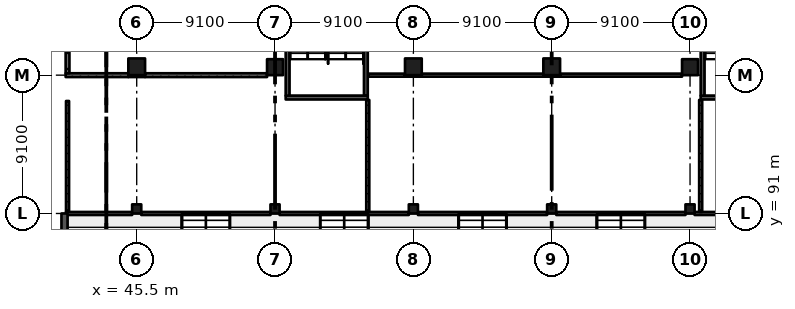
"""IFC4 building model, lengths in metres.
Left out: names, types, materials, properties, quantities, classifications, styles, units other than length and angle.
Written with IfcOpenShell. Run it as: python <this file> out.ifc"""

import sys

from ifc_helpers import new_model, si_unit, direction, frame, frame_2d, origin, origin_2d, place, context, subcontext, project, spatial, rectangle, extrude, element, fill, save


model = new_model("IFC4")
c1 = context("Model", 3, precision=1e-05, world=origin(), true_north=direction((0.0, 1.0)))
c2 = subcontext(c1, "Body", "Model", "MODEL_VIEW")
j1 = project(units=[si_unit("LENGTHUNIT", "METRE"), si_unit("PLANEANGLEUNIT", "RADIAN")], contexts=[c1])
p1 = place(None, origin())
s1 = spatial("IfcSite", under=j1, at=p1, CompositionType="ELEMENT")
p2 = place(p1, origin())
s2 = spatial("IfcBuilding", under=s1, at=p2, CompositionType="ELEMENT")
p3 = place(p2, origin())
s3 = spatial("IfcBuildingStorey", under=s2, at=p3, CompositionType="ELEMENT", Elevation=0.0)
p4 = place(p3, frame((45.5, 91.3, -0.4), z_axis=(0.0, 0.0, 1.0), x_axis=(1.0, 0.0, 0.0)))
e1 = element("IfcColumn", 1, at=p4, inside=s3, PredefinedType="COLUMN", context=c2, shape_type="SweptSolid", body=[
    extrude(rectangle(XDim=0.6, YDim=0.6, at=origin_2d()), origin(), (0.0, 0.0, 1.0), 6.77),
])
p5 = place(p3, frame((45.5, 100.65, -0.4), z_axis=(0.0, 0.0, 1.0), x_axis=(1.0, 0.0, 0.0)))
e2 = element("IfcColumn", 2, at=p5, inside=s3, PredefinedType="COLUMN", context=c2, shape_type="SweptSolid", body=[
    extrude(rectangle(XDim=1.1, YDim=1.1, at=origin_2d()), origin(), (0.0, 0.0, 1.0), 6.77),
])
p6 = place(p3, frame((54.6, 91.3, -0.4), z_axis=(0.0, 0.0, 1.0), x_axis=(1.0, 0.0, 0.0)))
e3 = element("IfcColumn", 3, at=p6, inside=s3, PredefinedType="COLUMN", context=c2, shape_type="SweptSolid", body=[
    extrude(rectangle(XDim=0.6, YDim=0.6, at=origin_2d()), origin(), (0.0, 0.0, 1.0), 6.77),
])
p7 = place(p3, frame((54.6, 100.625, -0.4), z_axis=(0.0, 0.0, 1.0), x_axis=(1.0, 0.0, 0.0)))
e4 = element("IfcColumn", 4, at=p7, inside=s3, PredefinedType="COLUMN", context=c2, shape_type="SweptSolid", body=[
    extrude(rectangle(XDim=1.05, YDim=1.05, at=origin_2d()), origin(), (0.0, 0.0, 1.0), 6.77),
])
p8 = place(p3, frame((63.7, 91.3, -0.4), z_axis=(0.0, 0.0, 1.0), x_axis=(1.0, 0.0, 0.0)))
e5 = element("IfcColumn", 5, at=p8, inside=s3, PredefinedType="COLUMN", context=c2, shape_type="SweptSolid", body=[
    extrude(rectangle(XDim=0.6, YDim=0.6, at=origin_2d()), origin(), (0.0, 0.0, 1.0), 6.77),
])
p9 = place(p3, frame((63.7, 100.65, -0.4), z_axis=(0.0, 0.0, 1.0), x_axis=(1.0, 0.0, 0.0)))
e6 = element("IfcColumn", 6, at=p9, inside=s3, PredefinedType="COLUMN", context=c2, shape_type="SweptSolid", body=[
    extrude(rectangle(XDim=1.1, YDim=1.1, at=origin_2d()), origin(), (0.0, 0.0, 1.0), 6.77),
])
p10 = place(p3, frame((72.8, 91.3, -0.4), z_axis=(0.0, 0.0, 1.0), x_axis=(1.0, 0.0, 0.0)))
e7 = element("IfcColumn", 7, at=p10, inside=s3, PredefinedType="COLUMN", context=c2, shape_type="SweptSolid", body=[
    extrude(rectangle(XDim=0.6, YDim=0.6, at=origin_2d()), origin(), (0.0, 0.0, 1.0), 6.77),
])
p11 = place(p3, frame((72.8, 100.65, -0.4), z_axis=(0.0, 0.0, 1.0), x_axis=(1.0, 0.0, 0.0)))
e8 = element("IfcColumn", 8, at=p11, inside=s3, PredefinedType="COLUMN", context=c2, shape_type="SweptSolid", body=[
    extrude(rectangle(XDim=1.1, YDim=1.1, at=origin_2d()), origin(), (0.0, 0.0, 1.0), 6.77),
])
p12 = place(p3, frame((81.9, 91.3, -0.4), z_axis=(0.0, 0.0, 1.0), x_axis=(1.0, 0.0, 0.0)))
e9 = element("IfcColumn", 9, at=p12, inside=s3, PredefinedType="COLUMN", context=c2, shape_type="SweptSolid", body=[
    extrude(rectangle(XDim=0.6, YDim=0.6, at=origin_2d()), origin(), (0.0, 0.0, 1.0), 6.77),
])
p13 = place(p3, frame((81.9, 100.625, -0.4), z_axis=(0.0, 0.0, 1.0), x_axis=(1.0, 0.0, 0.0)))
e10 = element("IfcColumn", 10, at=p13, inside=s3, PredefinedType="COLUMN", context=c2, shape_type="SweptSolid", body=[
    extrude(rectangle(XDim=1.05, YDim=1.05, at=origin_2d()), origin(), (0.0, 0.0, 1.0), 6.77),
])
p14 = place(p3, frame((40.75, 72.8, -0.4), z_axis=(0.0, 0.0, 1.0), x_axis=(0.0, 1.0, 0.0)))
e11 = element("IfcWall", 11, at=p14, inside=s3, PredefinedType="SHEAR", context=c2, shape_type="SweptSolid", body=[
    extrude(rectangle(XDim=18.2, YDim=0.4, at=frame_2d((9.1, 0.0))), origin(), (0.0, 0.0, 1.0), 6.77),
])
p15 = place(p3, frame((60.7, 98.625, -0.4), z_axis=(0.0, 0.0, 1.0), x_axis=(-1.0, 0.0, 0.0)))
e12 = element("IfcWall", 12, at=p15, inside=s3, PredefinedType="SHEAR", context=c2, shape_type="SweptSolid", body=[
    extrude(rectangle(XDim=5.4, YDim=0.25, at=frame_2d((2.7, 0.0))), origin(), (0.0, 0.0, 1.0), 6.77),
])
p16 = place(p15, frame((1.5, 0.0, 0.4)))
e13 = element("IfcOpeningElement", 13, at=p16, cuts=e12, PredefinedType="OPENING", context=c2, shape_type="SweptSolid", body=[
    extrude(rectangle(XDim=2.4, YDim=2.1, at=frame_2d((1.2, 1.05))), frame((0.0, 0.135, 0.0), z_axis=(0.0, -1.0, 0.0), x_axis=(1.0, 0.0, 0.0)), (0.0, 0.0, 1.0), 0.27),
])
for number, where, z_axis, x_axis in (
    (14, (55.425, 108.35, -0.4), (0.0, 0.0, 1.0), (0.0, -1.0, 0.0)),
    (15, (60.575, 108.35, -0.4), (0.0, 0.0, 1.0), (0.0, -1.0, 0.0)),
):
    element("IfcWall", number, at=place(p3, frame(where, z_axis=z_axis, x_axis=x_axis)), inside=s3, PredefinedType="SHEAR", context=c2, shape_type="SweptSolid", body=[
        extrude(rectangle(XDim=9.6, YDim=0.25, at=frame_2d((4.8, 0.0))), origin(), (0.0, 0.0, 1.0), 6.77),
    ])
p17 = place(p3, frame((88.0, 98.625, -0.4), z_axis=(0.0, 0.0, 1.0), x_axis=(-1.0, 0.0, 0.0)))
e16 = element("IfcWall", 16, at=p17, inside=s3, PredefinedType="SHEAR", context=c2, shape_type="SweptSolid", body=[
    extrude(rectangle(XDim=5.4, YDim=0.25, at=frame_2d((2.7, 0.0))), origin(), (0.0, 0.0, 1.0), 6.77),
])
p18 = place(p17, frame((1.5, 0.0, 0.4)))
e17 = element("IfcOpeningElement", 17, at=p18, cuts=e16, PredefinedType="OPENING", context=c2, shape_type="SweptSolid", body=[
    extrude(rectangle(XDim=2.4, YDim=2.1, at=frame_2d((1.2, 1.05))), frame((0.0, 0.135, 0.0), z_axis=(0.0, -1.0, 0.0), x_axis=(1.0, 0.0, 0.0)), (0.0, 0.0, 1.0), 0.27),
])
p19 = place(p3, frame((82.725, 108.35, -0.4), z_axis=(0.0, 0.0, 1.0), x_axis=(0.0, -1.0, 0.0)))
e18 = element("IfcWall", 18, at=p19, inside=s3, PredefinedType="SHEAR", context=c2, shape_type="SweptSolid", body=[
    extrude(rectangle(XDim=9.6, YDim=0.25, at=frame_2d((4.8, 0.0))), origin(), (0.0, 0.0, 1.0), 6.77),
])
p20 = place(p3, frame((40.825, 100.1, 0.0), z_axis=(0.0, 0.0, 1.0), x_axis=(1.0, 0.0, 0.0)))
e19 = element("IfcWall", 19, at=p20, inside=s3, PredefinedType="SOLIDWALL", context=c2, shape_type="SweptSolid", body=[
    extrude(rectangle(XDim=4.125, YDim=0.25, at=frame_2d((2.062, 0.0))), origin(), (0.0, 0.0, 1.0), 5.32),
])
p21 = place(p3, frame((40.95, 98.4, 0.0), z_axis=(0.0, 0.0, 1.0), x_axis=(0.0, -1.0, 0.0)))
e20 = element("IfcWall", 20, at=p21, inside=s3, PredefinedType="PARTITIONING", context=c2, shape_type="SweptSolid", body=[
    extrude(rectangle(XDim=7.3, YDim=0.2, at=frame_2d((3.65, 0.0))), origin(), (0.0, 0.0, 1.0), 6.02),
])
p22 = place(p21, frame((0.95, 0.0, 0.0)))
e21 = element("IfcOpeningElement", 21, at=p22, cuts=e20, PredefinedType="OPENING", context=c2, shape_type="SweptSolid", body=[
    extrude(rectangle(XDim=1.8, YDim=2.4, at=frame_2d((0.9, 1.2))), frame((0.0, 0.11, 0.0), z_axis=(0.0, -1.0, 0.0), x_axis=(1.0, 0.0, 0.0)), (0.0, 0.0, 1.0), 0.22),
])
p23 = place(p21, frame((4.55, 0.0, 0.0)))
e22 = element("IfcOpeningElement", 22, at=p23, cuts=e20, PredefinedType="OPENING", context=c2, shape_type="SweptSolid", body=[
    extrude(rectangle(XDim=1.8, YDim=2.4, at=frame_2d((0.9, 1.2))), frame((0.0, 0.11, 0.0), z_axis=(0.0, -1.0, 0.0), x_axis=(1.0, 0.0, 0.0)), (0.0, 0.0, 1.0), 0.22),
])
p24 = place(p3, frame((40.95, 109.05, 0.0), z_axis=(0.0, 0.0, 1.0), x_axis=(0.0, -1.0, 0.0)))
e23 = element("IfcWall", 23, at=p24, inside=s3, PredefinedType="SOLIDWALL", context=c2, shape_type="SweptSolid", body=[
    extrude(rectangle(XDim=8.825, YDim=0.25, at=frame_2d((4.413, 0.0))), origin(), (0.0, 0.0, 1.0), 6.02),
])
p25 = place(p3, frame((45.2, 91.0, 0.0), z_axis=(0.0, 0.0, 1.0), x_axis=(-1.0, 0.0, 0.0)))
e24 = element("IfcWall", 24, at=p25, inside=s3, PredefinedType="PARTITIONING", context=c2, shape_type="SweptSolid", body=[
    extrude(rectangle(XDim=4.35, YDim=0.2, at=frame_2d((2.175, 0.0))), origin(), (0.0, 0.0, 1.0), 5.02),
])
for number, where, z_axis, x_axis in (
    (25, (54.3, 91.0, 0.0), (0.0, 0.0, 1.0), (-1.0, 0.0, 0.0)),
    (26, (54.9, 91.0, 0.0), (0.0, 0.0, 1.0), (1.0, 0.0, 0.0)),
):
    element("IfcWall", number, at=place(p3, frame(where, z_axis=z_axis, x_axis=x_axis)), inside=s3, PredefinedType="PARTITIONING", context=c2, shape_type="SweptSolid", body=[
        extrude(rectangle(XDim=8.5, YDim=0.2, at=frame_2d((4.25, 0.0))), origin(), (0.0, 0.0, 1.0), 5.02),
    ])
p26 = place(p3, frame((60.7, 98.47, 0.0), z_axis=(0.0, 0.0, 1.0), x_axis=(0.0, -1.0, 0.0)))
e27 = element("IfcWall", 27, at=p26, inside=s3, PredefinedType="PARTITIONING", context=c2, shape_type="SweptSolid", body=[
    extrude(rectangle(XDim=7.37, YDim=0.2, at=frame_2d((3.685, 0.0))), origin(), (0.0, 0.0, 1.0), 6.02),
])
p27 = place(p26, frame((2.15, 0.0, 0.0)))
e28 = element("IfcOpeningElement", 28, at=p27, cuts=e27, PredefinedType="OPENING", context=c2, shape_type="SweptSolid", body=[
    extrude(rectangle(XDim=3.0, YDim=2.4, at=frame_2d((1.5, 1.2))), frame((0.0, 0.11, 0.0), z_axis=(0.0, -1.0, 0.0), x_axis=(1.0, 0.0, 0.0)), (0.0, 0.0, 1.0), 0.22),
])
p28 = place(p3, frame((60.73, 100.1, 0.0), z_axis=(0.0, 0.0, 1.0), x_axis=(1.0, 0.0, 0.0)))
e29 = element("IfcWall", 29, at=p28, inside=s3, PredefinedType="PARTITIONING", context=c2, shape_type="SweptSolid", body=[
    extrude(rectangle(XDim=2.42, YDim=0.2, at=frame_2d((1.21, 0.0))), origin(), (0.0, 0.0, 1.0), 5.57),
])
p29 = place(p28, frame((0.55, 0.0, 0.0)))
e30 = element("IfcOpeningElement", 30, at=p29, cuts=e29, PredefinedType="OPENING", context=c2, shape_type="SweptSolid", body=[
    extrude(rectangle(XDim=1.8, YDim=2.4, at=frame_2d((0.9, 1.2))), frame((0.0, 0.11, 0.0), z_axis=(0.0, -1.0, 0.0), x_axis=(1.0, 0.0, 0.0)), (0.0, 0.0, 1.0), 0.22),
])
for number, where, z_axis, x_axis in (
    (31, (72.5, 91.0, 0.0), (0.0, 0.0, 1.0), (-1.0, 0.0, 0.0)),
    (32, (81.6, 91.0, 0.0), (0.0, 0.0, 1.0), (-1.0, 0.0, 0.0)),
    (33, (82.2, 91.0, 0.0), (0.0, 0.0, 1.0), (1.0, 0.0, 0.0)),
):
    element("IfcWall", number, at=place(p3, frame(where, z_axis=z_axis, x_axis=x_axis)), inside=s3, PredefinedType="PARTITIONING", context=c2, shape_type="SweptSolid", body=[
        extrude(rectangle(XDim=8.5, YDim=0.2, at=frame_2d((4.25, 0.0))), origin(), (0.0, 0.0, 1.0), 5.02),
    ])
p30 = place(p3, frame((82.6, 98.47, 0.0), z_axis=(0.0, 0.0, 1.0), x_axis=(0.0, -1.0, 0.0)))
e34 = element("IfcWall", 34, at=p30, inside=s3, PredefinedType="PARTITIONING", context=c2, shape_type="SweptSolid", body=[
    extrude(rectangle(XDim=7.37, YDim=0.2, at=frame_2d((3.685, 0.0))), origin(), (0.0, 0.0, 1.0), 6.02),
])
p31 = place(p30, frame((2.15, 0.0, 0.0)))
e35 = element("IfcOpeningElement", 35, at=p31, cuts=e34, PredefinedType="OPENING", context=c2, shape_type="SweptSolid", body=[
    extrude(rectangle(XDim=3.0, YDim=2.4, at=frame_2d((1.5, 1.2))), frame((0.0, 0.11, 0.0), z_axis=(0.0, -1.0, 0.0), x_axis=(1.0, 0.0, 0.0)), (0.0, 0.0, 1.0), 0.22),
])
p32 = place(p3, frame((44.95, 100.1, 0.0), z_axis=(0.0, 0.0, 1.0), x_axis=(1.0, 0.0, 0.0)))
e36 = element("IfcWall", 36, at=p32, inside=s3, PredefinedType="SOLIDWALL", context=c2, shape_type="SweptSolid", body=[
    extrude(rectangle(XDim=1.1, YDim=0.25, at=frame_2d((0.55, 0.0))), origin(), (0.0, 0.0, 1.0), 6.02),
])
p33 = place(p3, frame((46.05, 100.1, 0.0), z_axis=(0.0, 0.0, 1.0), x_axis=(1.0, 0.0, 0.0)))
e37 = element("IfcWall", 37, at=p33, inside=s3, PredefinedType="SOLIDWALL", context=c2, shape_type="SweptSolid", body=[
    extrude(rectangle(XDim=8.025, YDim=0.25, at=frame_2d((4.012, 0.0))), origin(), (0.0, 0.0, 1.0), 5.32),
])
p34 = place(p33, frame((0.525, 0.0, 0.0)))
e38 = element("IfcOpeningElement", 38, at=p34, cuts=e37, PredefinedType="OPENING", context=c2, shape_type="SweptSolid", body=[
    extrude(rectangle(XDim=1.8, YDim=2.1, at=frame_2d((0.9, 1.05))), frame((0.0, 0.135, 0.0), z_axis=(0.0, -1.0, 0.0), x_axis=(1.0, 0.0, 0.0)), (0.0, 0.0, 1.0), 0.27),
])
p35 = place(p3, frame((63.15, 100.1, 0.0), z_axis=(0.0, 0.0, 1.0), x_axis=(1.0, 0.0, 0.0)))
e39 = element("IfcWall", 39, at=p35, inside=s3, PredefinedType="PARTITIONING", context=c2, shape_type="SweptSolid", body=[
    extrude(rectangle(XDim=1.1, YDim=0.2, at=frame_2d((0.55, 0.0))), origin(), (0.0, 0.0, 1.0), 6.02),
])
p36 = place(p3, frame((64.25, 100.1, 0.0), z_axis=(0.0, 0.0, 1.0), x_axis=(1.0, 0.0, 0.0)))
e40 = element("IfcWall", 40, at=p36, inside=s3, PredefinedType="PARTITIONING", context=c2, shape_type="SweptSolid", body=[
    extrude(rectangle(XDim=8.0, YDim=0.2, at=frame_2d((4.0, 0.0))), origin(), (0.0, 0.0, 1.0), 5.32),
])
p37 = place(p36, frame((0.73, 0.0, 0.0)))
e41 = element("IfcOpeningElement", 41, at=p37, cuts=e40, PredefinedType="OPENING", context=c2, shape_type="SweptSolid", body=[
    extrude(rectangle(XDim=1.8, YDim=2.4, at=frame_2d((0.9, 1.2))), frame((0.0, 0.11, 0.0), z_axis=(0.0, -1.0, 0.0), x_axis=(1.0, 0.0, 0.0)), (0.0, 0.0, 1.0), 0.22),
])
p38 = place(p36, frame((4.23, 0.0, 0.0)))
e42 = element("IfcOpeningElement", 42, at=p38, cuts=e40, PredefinedType="OPENING", context=c2, shape_type="SweptSolid", body=[
    extrude(rectangle(XDim=1.8, YDim=2.4, at=frame_2d((0.9, 1.2))), frame((0.0, 0.11, 0.0), z_axis=(0.0, -1.0, 0.0), x_axis=(1.0, 0.0, 0.0)), (0.0, 0.0, 1.0), 0.22),
])
p39 = place(p36, frame((6.13, 0.0, 0.0)))
e43 = element("IfcOpeningElement", 43, at=p39, cuts=e40, PredefinedType="OPENING", context=c2, shape_type="SweptSolid", body=[
    extrude(rectangle(XDim=1.8, YDim=2.4, at=frame_2d((0.9, 1.2))), frame((0.0, 0.11, 0.0), z_axis=(0.0, -1.0, 0.0), x_axis=(1.0, 0.0, 0.0)), (0.0, 0.0, 1.0), 0.22),
])
p40 = place(p3, frame((72.25, 100.1, 0.0), z_axis=(0.0, 0.0, 1.0), x_axis=(1.0, 0.0, 0.0)))
e44 = element("IfcWall", 44, at=p40, inside=s3, PredefinedType="PARTITIONING", context=c2, shape_type="SweptSolid", body=[
    extrude(rectangle(XDim=1.1, YDim=0.2, at=frame_2d((0.55, 0.0))), origin(), (0.0, 0.0, 1.0), 6.02),
])
p41 = place(p3, frame((73.35, 100.1, 0.0), z_axis=(0.0, 0.0, 1.0), x_axis=(1.0, 0.0, 0.0)))
e45 = element("IfcWall", 45, at=p41, inside=s3, PredefinedType="PARTITIONING", context=c2, shape_type="SweptSolid", body=[
    extrude(rectangle(XDim=8.025, YDim=0.2, at=frame_2d((4.012, 0.0))), origin(), (0.0, 0.0, 1.0), 5.32),
])
p42 = place(p41, frame((1.93, 0.0, 0.0)))
e46 = element("IfcOpeningElement", 46, at=p42, cuts=e45, PredefinedType="OPENING", context=c2, shape_type="SweptSolid", body=[
    extrude(rectangle(XDim=1.8, YDim=2.4, at=frame_2d((0.9, 1.2))), frame((0.0, 0.11, 0.0), z_axis=(0.0, -1.0, 0.0), x_axis=(1.0, 0.0, 0.0)), (0.0, 0.0, 1.0), 0.22),
])
p43 = place(p41, frame((5.43, 0.0, 0.0)))
e47 = element("IfcOpeningElement", 47, at=p43, cuts=e45, PredefinedType="OPENING", context=c2, shape_type="SweptSolid", body=[
    extrude(rectangle(XDim=1.8, YDim=2.4, at=frame_2d((0.9, 1.2))), frame((0.0, 0.11, 0.0), z_axis=(0.0, -1.0, 0.0), x_axis=(1.0, 0.0, 0.0)), (0.0, 0.0, 1.0), 0.22),
])
p44 = place(p34, origin())
e48 = element("IfcDoor", 48, at=p44, inside=s3, OperationType="DOUBLE_DOOR_SINGLE_SWING", PredefinedType="DOOR", context=c2, shape_type="SweptSolid", body=[
    extrude(rectangle(XDim=1.8, YDim=2.1, at=frame_2d((0.9, 1.05))), frame((0.0, 0.025, 0.0), z_axis=(0.0, -1.0, 0.0), x_axis=(1.0, 0.0, 0.0)), (0.0, 0.0, 1.0), 0.05),
])
fill(e38, e48)
p45 = place(p22, origin())
e49 = element("IfcDoor", 49, at=p45, inside=s3, OperationType="DOUBLE_DOOR_SINGLE_SWING", PredefinedType="DOOR", context=c2, shape_type="SweptSolid", body=[
    extrude(rectangle(XDim=1.8, YDim=2.4, at=frame_2d((0.9, 1.2))), frame((0.0, 0.025, 0.0), z_axis=(0.0, -1.0, 0.0), x_axis=(1.0, 0.0, 0.0)), (0.0, 0.0, 1.0), 0.05),
])
fill(e21, e49)
p46 = place(p23, origin())
e50 = element("IfcDoor", 50, at=p46, inside=s3, OperationType="DOUBLE_DOOR_SINGLE_SWING", PredefinedType="DOOR", context=c2, shape_type="SweptSolid", body=[
    extrude(rectangle(XDim=1.8, YDim=2.4, at=frame_2d((0.9, 1.2))), frame((0.0, 0.025, 0.0), z_axis=(0.0, -1.0, 0.0), x_axis=(1.0, 0.0, 0.0)), (0.0, 0.0, 1.0), 0.05),
])
fill(e22, e50)
p47 = place(p31, origin())
e51 = element("IfcDoor", 51, at=p47, inside=s3, OperationType="DOUBLE_DOOR_SINGLE_SWING", PredefinedType="DOOR", context=c2, shape_type="SweptSolid", body=[
    extrude(rectangle(XDim=3.0, YDim=2.4, at=frame_2d((1.5, 1.2))), frame((0.0, 0.025, 0.0), z_axis=(0.0, -1.0, 0.0), x_axis=(1.0, 0.0, 0.0)), (0.0, 0.0, 1.0), 0.05),
])
fill(e35, e51)
p48 = place(p29, origin())
e52 = element("IfcDoor", 52, at=p48, inside=s3, OperationType="DOUBLE_DOOR_SINGLE_SWING", PredefinedType="DOOR", context=c2, shape_type="SweptSolid", body=[
    extrude(rectangle(XDim=1.8, YDim=2.4, at=frame_2d((0.9, 1.2))), frame((0.0, 0.025, 0.0), z_axis=(0.0, -1.0, 0.0), x_axis=(1.0, 0.0, 0.0)), (0.0, 0.0, 1.0), 0.05),
])
fill(e30, e52)
p49 = place(p37, origin())
e53 = element("IfcDoor", 53, at=p49, inside=s3, OperationType="DOUBLE_DOOR_SINGLE_SWING", PredefinedType="DOOR", context=c2, shape_type="SweptSolid", body=[
    extrude(rectangle(XDim=1.8, YDim=2.4, at=frame_2d((0.9, 1.2))), frame((0.0, 0.025, 0.0), z_axis=(0.0, -1.0, 0.0), x_axis=(1.0, 0.0, 0.0)), (0.0, 0.0, 1.0), 0.05),
])
fill(e41, e53)
p50 = place(p38, origin())
e54 = element("IfcDoor", 54, at=p50, inside=s3, OperationType="DOUBLE_DOOR_SINGLE_SWING", PredefinedType="DOOR", context=c2, shape_type="SweptSolid", body=[
    extrude(rectangle(XDim=1.8, YDim=2.4, at=frame_2d((0.9, 1.2))), frame((0.0, 0.025, 0.0), z_axis=(0.0, -1.0, 0.0), x_axis=(1.0, 0.0, 0.0)), (0.0, 0.0, 1.0), 0.05),
])
fill(e42, e54)
p51 = place(p39, origin())
e55 = element("IfcDoor", 55, at=p51, inside=s3, OperationType="DOUBLE_DOOR_SINGLE_SWING", PredefinedType="DOOR", context=c2, shape_type="SweptSolid", body=[
    extrude(rectangle(XDim=1.8, YDim=2.4, at=frame_2d((0.9, 1.2))), frame((0.0, 0.025, 0.0), z_axis=(0.0, -1.0, 0.0), x_axis=(1.0, 0.0, 0.0)), (0.0, 0.0, 1.0), 0.05),
])
fill(e43, e55)
p52 = place(p42, origin())
e56 = element("IfcDoor", 56, at=p52, inside=s3, OperationType="DOUBLE_DOOR_SINGLE_SWING", PredefinedType="DOOR", context=c2, shape_type="SweptSolid", body=[
    extrude(rectangle(XDim=1.8, YDim=2.4, at=frame_2d((0.9, 1.2))), frame((0.0, 0.025, 0.0), z_axis=(0.0, -1.0, 0.0), x_axis=(1.0, 0.0, 0.0)), (0.0, 0.0, 1.0), 0.05),
])
fill(e46, e56)
p53 = place(p43, origin())
e57 = element("IfcDoor", 57, at=p53, inside=s3, OperationType="DOUBLE_DOOR_SINGLE_SWING", PredefinedType="DOOR", context=c2, shape_type="SweptSolid", body=[
    extrude(rectangle(XDim=1.8, YDim=2.4, at=frame_2d((0.9, 1.2))), frame((0.0, 0.025, 0.0), z_axis=(0.0, -1.0, 0.0), x_axis=(1.0, 0.0, 0.0)), (0.0, 0.0, 1.0), 0.05),
])
fill(e47, e57)
p54 = place(p27, origin())
e58 = element("IfcDoor", 58, at=p54, inside=s3, OperationType="DOUBLE_DOOR_SINGLE_SWING", PredefinedType="DOOR", context=c2, shape_type="SweptSolid", body=[
    extrude(rectangle(XDim=3.0, YDim=2.4, at=frame_2d((1.5, 1.2))), frame((0.0, 0.025, 0.0), z_axis=(0.0, -1.0, 0.0), x_axis=(1.0, 0.0, 0.0)), (0.0, 0.0, 1.0), 0.05),
])
fill(e28, e58)
p55 = place(p16, origin())
e59 = element("IfcDoor", 59, at=p55, inside=s3, OperationType="DOUBLE_DOOR_SINGLE_SWING", PredefinedType="DOOR", context=c2, shape_type="SweptSolid", body=[
    extrude(rectangle(XDim=2.4, YDim=2.1, at=frame_2d((1.2, 1.05))), frame((0.0, 0.025, 0.0), z_axis=(0.0, -1.0, 0.0), x_axis=(1.0, 0.0, 0.0)), (0.0, 0.0, 1.0), 0.05),
])
fill(e13, e59)
save(model, sys.argv[1])
